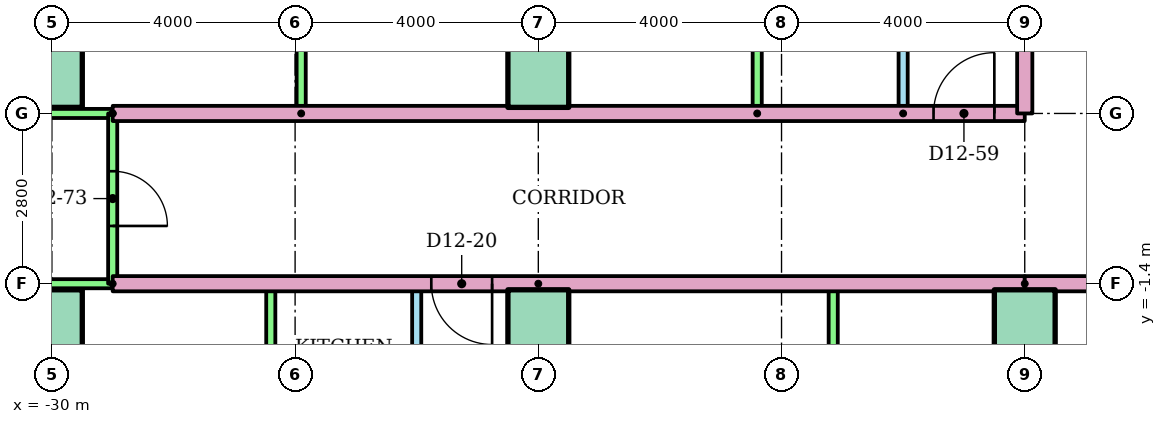
"""IFC4 building model, lengths in metres.
Left out: names, types, materials, properties, quantities, classifications, styles, units other than length and angle.
Written with IfcOpenShell. Run it as: python <this file> out.ifc"""

import sys

from ifc_helpers import new_model, si_unit, direction, frame, frame_2d, origin, origin_2d, place, context, subcontext, project, spatial, rectangle, extrude, element, fill, save


model = new_model("IFC4")
c1 = context("Model", 3, precision=1e-05, world=origin(), true_north=direction((0.0, 1.0)))
c2 = subcontext(c1, "Body", "Model", "MODEL_VIEW")
j1 = project(units=[si_unit("LENGTHUNIT", "METRE"), si_unit("PLANEANGLEUNIT", "RADIAN")], contexts=[c1])
p1 = place(None, origin())
s1 = spatial("IfcSite", under=j1, at=p1, CompositionType="ELEMENT")
p2 = place(p1, origin())
s2 = spatial("IfcBuilding", under=s1, at=p2, CompositionType="ELEMENT")
p3 = place(p2, frame((0.0, 0.0, 48.0)))
s3 = spatial("IfcBuildingStorey", under=s2, at=p3, CompositionType="ELEMENT", Elevation=48.0)
for number, where in (
    (1, (-30.0, -2.0, 0.0)),
    (2, (-22.0, -2.0, 0.0)),
    (3, (-14.0, -2.0, 0.0)),
    (4, (-30.0, 2.0, 0.0)),
    (5, (-22.0, 2.0, 0.0)),
):
    element("IfcColumn", number, at=place(p3, frame(where)), inside=s3, PredefinedType="COLUMN", context=c2, shape_type="SweptSolid", body=[
        extrude(rectangle(XDim=1.0, YDim=1.0, at=origin_2d()), origin(), (0.0, 0.0, 1.0), 3.2),
    ])
p4 = place(p3, frame((-24.0, -7.8, 0.0), z_axis=(0.0, 0.0, 1.0), x_axis=(0.0, 1.0, 0.0)))
e6 = element("IfcWall", 6, at=p4, inside=s3, PredefinedType="PARTITIONING", context=c2, shape_type="SweptSolid", body=[
    extrude(rectangle(XDim=6.4, YDim=0.15, at=frame_2d((3.2, 0.0))), origin(), (0.0, 0.0, 1.0), 2.4),
])
p5 = place(p4, frame((4.14, 0.0, 0.0)))
e7 = element("IfcOpeningElement", 7, at=p5, cuts=e6, PredefinedType="OPENING", context=c2, shape_type="SweptSolid", body=[
    extrude(rectangle(XDim=0.9, YDim=2.1, at=frame_2d((0.45, 1.05))), frame((0.0, 0.085, 0.0), z_axis=(0.0, -1.0, 0.0), x_axis=(1.0, 0.0, 0.0)), (0.0, 0.0, 1.0), 0.17),
])
p6 = place(p4, frame((1.05, 0.0, 0.0)))
e8 = element("IfcOpeningElement", 8, at=p6, cuts=e6, PredefinedType="OPENING", context=c2, shape_type="SweptSolid", body=[
    extrude(rectangle(XDim=0.8, YDim=2.1, at=frame_2d((0.4, 1.05))), frame((0.0, 0.085, 0.0), z_axis=(0.0, -1.0, 0.0), x_axis=(1.0, 0.0, 0.0)), (0.0, 0.0, 1.0), 0.17),
])
for number, where, z_axis, x_axis in (
    (9, (-26.4, -7.8, 0.0), (0.0, 0.0, 1.0), (0.0, 1.0, 0.0)),
    (10, (-17.15, -7.8, 0.0), (0.0, 0.0, 1.0), (0.0, 1.0, 0.0)),
):
    element("IfcWall", number, at=place(p3, frame(where, z_axis=z_axis, x_axis=x_axis)), inside=s3, PredefinedType="PARTITIONING", context=c2, shape_type="SweptSolid", body=[
        extrude(rectangle(XDim=6.4, YDim=0.15, at=frame_2d((3.2, 0.0))), origin(), (0.0, 0.0, 1.0), 2.4),
    ])
p7 = place(p3, frame((-22.0, -1.4, 0.0), z_axis=(0.0, 0.0, 1.0), x_axis=(0.0, -1.0, 0.0)))
e11 = element("IfcWall", 11, at=p7, inside=s3, PredefinedType="PARTITIONING", context=c2, shape_type="SweptSolid", body=[
    extrude(rectangle(XDim=14.71, YDim=0.25, at=frame_2d((7.355, 0.0))), origin(), (0.0, 0.0, 1.0), 2.4),
])
p8 = place(p3, frame((-14.0, -1.4, 0.0), z_axis=(0.0, 0.0, 1.0), x_axis=(-1.0, 0.0, 0.0)))
e12 = element("IfcWall", 12, at=p8, inside=s3, PredefinedType="PARTITIONING", context=c2, shape_type="SweptSolid", body=[
    extrude(rectangle(XDim=15.0, YDim=0.25, at=frame_2d((7.5, 0.0))), origin(), (0.0, 0.0, 1.0), 2.4),
])
p9 = place(p8, frame((8.76, 0.0, 0.0)))
e13 = element("IfcOpeningElement", 13, at=p9, cuts=e12, PredefinedType="OPENING", context=c2, shape_type="SweptSolid", body=[
    extrude(rectangle(XDim=1.0, YDim=2.1, at=frame_2d((0.5, 1.05))), frame((0.0, 0.135, 0.0), z_axis=(0.0, -1.0, 0.0), x_axis=(1.0, 0.0, 0.0)), (0.0, 0.0, 1.0), 0.27),
])
p10 = place(p3, frame((-29.0, -1.4, 0.0), z_axis=(0.0, 0.0, 1.0), x_axis=(-1.0, 0.0, 0.0)))
e14 = element("IfcWall", 14, at=p10, inside=s3, PredefinedType="PARTITIONING", context=c2, shape_type="SweptSolid", body=[
    extrude(rectangle(XDim=7.52, YDim=0.15, at=frame_2d((3.76, 0.0))), origin(), (0.0, 0.0, 1.0), 2.4),
])
p11 = place(p3, frame((-16.0, 1.4, 0.0), z_axis=(0.0, 0.0, 1.0), x_axis=(0.0, 1.0, 0.0)))
e15 = element("IfcWall", 15, at=p11, inside=s3, PredefinedType="PARTITIONING", context=c2, shape_type="SweptSolid", body=[
    extrude(rectangle(XDim=8.8, YDim=0.15, at=frame_2d((4.4, 0.0))), origin(), (0.0, 0.0, 1.0), 2.4),
])
p12 = place(p11, frame((1.925, 0.0, 0.0)))
e16 = element("IfcOpeningElement", 16, at=p12, cuts=e15, PredefinedType="OPENING", context=c2, shape_type="SweptSolid", body=[
    extrude(rectangle(XDim=0.9, YDim=2.1, at=frame_2d((0.45, 1.05))), frame((0.0, 0.085, 0.0), z_axis=(0.0, -1.0, 0.0), x_axis=(1.0, 0.0, 0.0)), (0.0, 0.0, 1.0), 0.17),
])
p13 = place(p11, frame((6.375, 0.0, 0.0)))
e17 = element("IfcOpeningElement", 17, at=p13, cuts=e15, PredefinedType="OPENING", context=c2, shape_type="SweptSolid", body=[
    extrude(rectangle(XDim=0.8, YDim=2.1, at=frame_2d((0.4, 1.05))), frame((0.0, 0.085, 0.0), z_axis=(0.0, -1.0, 0.0), x_axis=(1.0, 0.0, 0.0)), (0.0, 0.0, 1.0), 0.17),
])
for number, where, z_axis, x_axis in (
    (18, (-18.4, 1.4, 0.0), (0.0, 0.0, 1.0), (0.0, 1.0, 0.0)),
    (19, (-25.9, 1.4, 0.0), (0.0, 0.0, 1.0), (0.0, 1.0, 0.0)),
):
    element("IfcWall", number, at=place(p3, frame(where, z_axis=z_axis, x_axis=x_axis)), inside=s3, PredefinedType="PARTITIONING", context=c2, shape_type="SweptSolid", body=[
        extrude(rectangle(XDim=8.8, YDim=0.15, at=frame_2d((4.4, 0.0))), origin(), (0.0, 0.0, 1.0), 2.4),
    ])
p14 = place(p3, frame((-29.0, 1.4, 0.0)))
e20 = element("IfcWall", 20, at=p14, inside=s3, PredefinedType="PARTITIONING", context=c2, shape_type="SweptSolid", body=[
    extrude(rectangle(XDim=15.0, YDim=0.25, at=frame_2d((7.5, 0.0))), origin(), (0.0, 0.0, 1.0), 2.4),
])
p15 = place(p14, frame((13.5, 0.0, 0.0)))
e21 = element("IfcOpeningElement", 21, at=p15, cuts=e20, PredefinedType="OPENING", context=c2, shape_type="SweptSolid", body=[
    extrude(rectangle(XDim=1.0, YDim=2.1, at=frame_2d((0.5, 1.05))), frame((0.0, 0.135, 0.0), z_axis=(0.0, -1.0, 0.0), x_axis=(1.0, 0.0, 0.0)), (0.0, 0.0, 1.0), 0.27),
])
p16 = place(p3, frame((-36.52, 1.4, 0.0)))
e22 = element("IfcWall", 22, at=p16, inside=s3, PredefinedType="PARTITIONING", context=c2, shape_type="SweptSolid", body=[
    extrude(rectangle(XDim=7.52, YDim=0.15, at=frame_2d((3.76, 0.0))), origin(), (0.0, 0.0, 1.0), 2.4),
])
p17 = place(p3, frame((-29.0, 1.4, 0.0), z_axis=(0.0, 0.0, 1.0), x_axis=(0.0, -1.0, 0.0)))
e23 = element("IfcWall", 23, at=p17, inside=s3, PredefinedType="PARTITIONING", context=c2, shape_type="SweptSolid", body=[
    extrude(rectangle(XDim=2.8, YDim=0.15, at=frame_2d((1.4, 0.0))), origin(), (0.0, 0.0, 1.0), 2.4),
])
p18 = place(p17, frame((0.95, 0.0, 0.0)))
e24 = element("IfcOpeningElement", 24, at=p18, cuts=e23, PredefinedType="OPENING", context=c2, shape_type="SweptSolid", body=[
    extrude(rectangle(XDim=0.9, YDim=2.1, at=frame_2d((0.45, 1.05))), frame((0.0, 0.085, 0.0), z_axis=(0.0, -1.0, 0.0), x_axis=(1.0, 0.0, 0.0)), (0.0, 0.0, 1.0), 0.17),
])
p19 = place(p3, frame((14.0, -1.4, 0.0), z_axis=(0.0, 0.0, 1.0), x_axis=(-1.0, 0.0, 0.0)))
e25 = element("IfcWall", 25, at=p19, inside=s3, PredefinedType="PARTITIONING", context=c2, shape_type="SweptSolid", body=[
    extrude(rectangle(XDim=28.0, YDim=0.25, at=frame_2d((14.0, 0.0))), origin(), (0.0, 0.0, 1.0), 2.4),
])
p20 = place(p19, frame((12.76, 0.0, 0.0)))
e26 = element("IfcOpeningElement", 26, at=p20, cuts=e25, PredefinedType="OPENING", context=c2, shape_type="SweptSolid", body=[
    extrude(rectangle(XDim=1.0, YDim=2.1, at=frame_2d((0.5, 1.05))), frame((0.0, 0.135, 0.0), z_axis=(0.0, -1.0, 0.0), x_axis=(1.0, 0.0, 0.0)), (0.0, 0.0, 1.0), 0.27),
])
p21 = place(p19, frame((10.24, 0.0, 0.0)))
e27 = element("IfcOpeningElement", 27, at=p21, cuts=e25, PredefinedType="OPENING", context=c2, shape_type="SweptSolid", body=[
    extrude(rectangle(XDim=1.0, YDim=2.1, at=frame_2d((0.5, 1.05))), frame((0.0, 0.135, 0.0), z_axis=(0.0, -1.0, 0.0), x_axis=(1.0, 0.0, 0.0)), (0.0, 0.0, 1.0), 0.27),
])
p22 = place(p3, frame((-14.0, 3.0, 0.0), z_axis=(0.0, 0.0, 1.0), x_axis=(0.0, -1.0, 0.0)))
e28 = element("IfcWall", 28, at=p22, inside=s3, PredefinedType="PARTITIONING", context=c2, shape_type="SweptSolid", body=[
    extrude(rectangle(XDim=1.6, YDim=0.25, at=frame_2d((0.8, 0.0))), origin(), (0.0, 0.0, 1.0), 2.4),
])
p23 = place(p9, origin())
e29 = element("IfcDoor", 29, at=p23, inside=s3, OperationType="SINGLE_SWING_LEFT", PredefinedType="DOOR", context=c2, shape_type="SweptSolid", body=[
    extrude(rectangle(XDim=1.0, YDim=2.1, at=frame_2d((0.5, 1.05))), frame((0.0, 0.025, 0.0), z_axis=(0.0, -1.0, 0.0), x_axis=(1.0, 0.0, 0.0)), (0.0, 0.0, 1.0), 0.05),
])
fill(e13, e29)
p24 = place(p15, origin())
e30 = element("IfcDoor", 30, at=p24, inside=s3, OperationType="SINGLE_SWING_RIGHT", PredefinedType="DOOR", context=c2, shape_type="SweptSolid", body=[
    extrude(rectangle(XDim=1.0, YDim=2.1, at=frame_2d((0.5, 1.05))), frame((0.0, 0.025, 0.0), z_axis=(0.0, -1.0, 0.0), x_axis=(1.0, 0.0, 0.0)), (0.0, 0.0, 1.0), 0.05),
])
fill(e21, e30)
p25 = place(p18, origin())
e31 = element("IfcDoor", 31, at=p25, inside=s3, OperationType="SINGLE_SWING_RIGHT", PredefinedType="DOOR", context=c2, shape_type="SweptSolid", body=[
    extrude(rectangle(XDim=0.9, YDim=2.1, at=frame_2d((0.45, 1.05))), frame((0.0, 0.025, 0.0), z_axis=(0.0, -1.0, 0.0), x_axis=(1.0, 0.0, 0.0)), (0.0, 0.0, 1.0), 0.05),
])
fill(e24, e31)
save(model, sys.argv[1])
